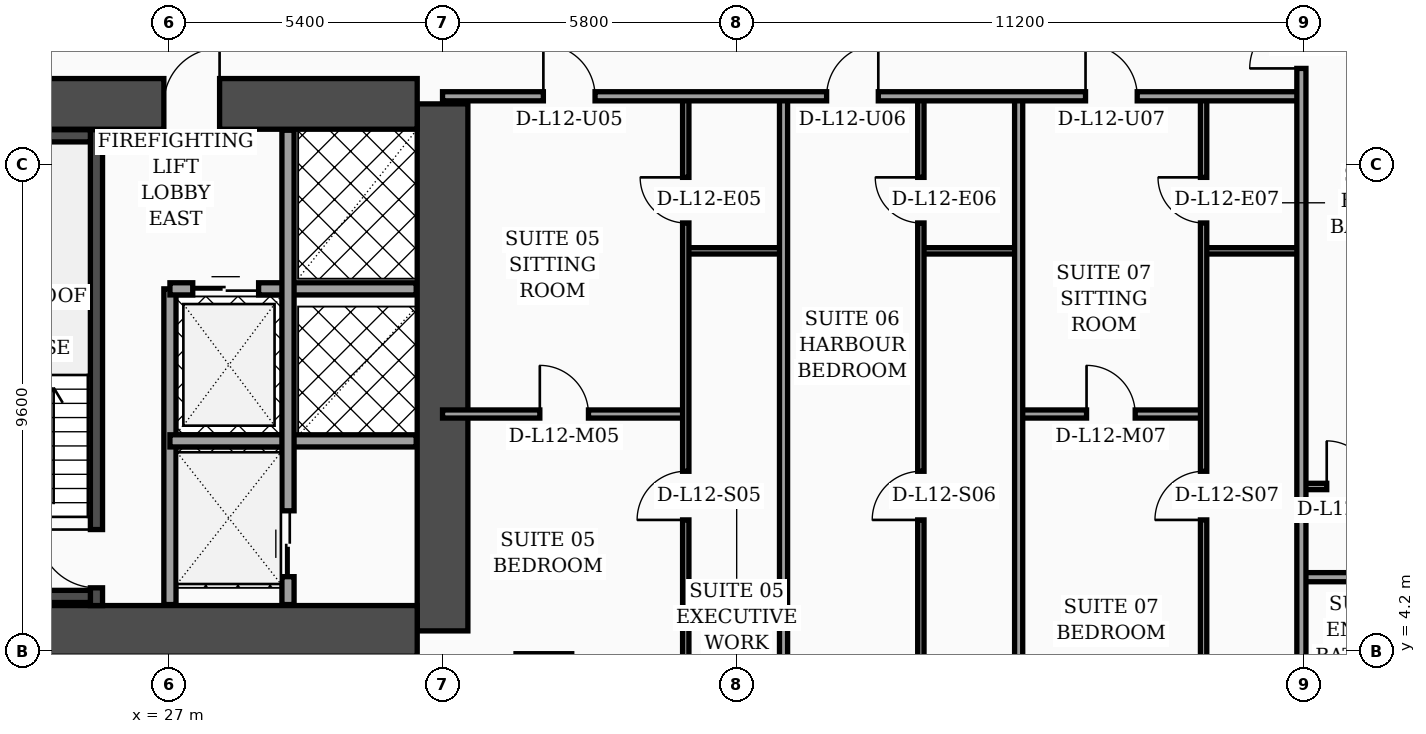
"""IFC4 building model, lengths in metres.
Left out: names, types, materials, properties, quantities, classifications, styles, units other than length and angle.
Written with IfcOpenShell. Run it as: python <this file> out.ifc"""

import sys

from ifc_helpers import new_model, si_unit, direction, frame, frame_2d, origin, origin_2d, place, context, subcontext, project, spatial, rectangle, hollow_rectangle, extrude, element, fill, save


model = new_model("IFC4")
c1 = context("Model", 3, precision=1e-05, world=origin(), true_north=direction((0.0, 1.0)))
c2 = subcontext(c1, "Body", "Model", "MODEL_VIEW")
j1 = project(units=[si_unit("LENGTHUNIT", "METRE"), si_unit("PLANEANGLEUNIT", "RADIAN")], contexts=[c1])
p1 = place(None, origin())
s1 = spatial("IfcSite", under=j1, at=p1, CompositionType="ELEMENT")
p2 = place(p1, origin())
s2 = spatial("IfcBuilding", under=s1, at=p2, CompositionType="ELEMENT")
p3 = place(p2, frame((0.0, 0.0, 54.6)))
s3 = spatial("IfcBuildingStorey", under=s2, at=p3, CompositionType="ELEMENT", Elevation=54.6)
p4 = place(p3, frame((32.4, 4.6, 0.0), z_axis=(0.0, 0.0, 1.0), x_axis=(0.0, 1.0, 0.0)))
e1 = element("IfcWall", 1, at=p4, inside=s3, PredefinedType="SHEAR", context=c2, shape_type="SweptSolid", body=[
    extrude(rectangle(XDim=10.4, YDim=1.0, at=frame_2d((5.2, 0.0))), origin(), (0.0, 0.0, 1.0), 3.56),
])
p5 = place(p3, frame((22.1, 15.0, 0.0), z_axis=(0.0, 0.0, 1.0), x_axis=(1.0, 0.0, 0.0)))
e2 = element("IfcWall", 2, at=p5, inside=s3, PredefinedType="SHEAR", context=c2, shape_type="SweptSolid", body=[
    extrude(rectangle(XDim=9.8, YDim=1.0, at=frame_2d((4.9, 0.0))), origin(), (0.0, 0.0, 1.0), 3.56),
])
p6 = place(p5, frame((4.8, 0.0, 0.0)))
e3 = element("IfcOpeningElement", 3, at=p6, cuts=e2, PredefinedType="OPENING", context=c2, shape_type="SweptSolid", body=[
    extrude(rectangle(XDim=1.1, YDim=2.2, at=frame_2d((0.55, 1.1))), frame((0.0, 0.51, 0.0), z_axis=(0.0, -1.0, 0.0), x_axis=(1.0, 0.0, 0.0)), (0.0, 0.0, 1.0), 1.02),
])
p7 = place(p3, frame((22.1, 4.6, 0.0), z_axis=(0.0, 0.0, 1.0), x_axis=(1.0, 0.0, 0.0)))
e4 = element("IfcWall", 4, at=p7, inside=s3, PredefinedType="SHEAR", context=c2, shape_type="SweptSolid", body=[
    extrude(rectangle(XDim=9.8, YDim=1.0, at=frame_2d((4.9, 0.0))), origin(), (0.0, 0.0, 1.0), 3.56),
])
p8 = place(p3, frame((25.57, 5.1, 0.0), z_axis=(0.0, 0.0, 1.0), x_axis=(0.0, 1.0, 0.0)))
e5 = element("IfcWall", 5, at=p8, inside=s3, PredefinedType="SOLIDWALL", context=c2, shape_type="SweptSolid", body=[
    extrude(rectangle(XDim=9.39, YDim=0.24, at=frame_2d((4.695, 0.0))), origin(), (0.0, 0.0, 1.0), 3.56),
])
p9 = place(p8, frame((0.35, 0.0, 0.0)))
e6 = element("IfcOpeningElement", 6, at=p9, cuts=e5, PredefinedType="OPENING", context=c2, shape_type="SweptSolid", body=[
    extrude(rectangle(XDim=1.15, YDim=2.2, at=frame_2d((0.575, 1.1))), frame((0.0, 0.13, 0.0), z_axis=(0.0, -1.0, 0.0), x_axis=(1.0, 0.0, 0.0)), (0.0, 0.0, 1.0), 0.26),
])
for number, where, z_axis, x_axis in (
    (7, (22.35, 5.28, 0.0), (0.0, 0.0, 1.0), (1.0, 0.0, 0.0)),
    (8, (22.35, 14.37, 0.0), (0.0, 0.0, 1.0), (1.0, 0.0, 0.0)),
):
    element("IfcWall", number, at=place(p3, frame(where, z_axis=z_axis, x_axis=x_axis)), inside=s3, PredefinedType="SOLIDWALL", context=c2, shape_type="SweptSolid", body=[
        extrude(rectangle(XDim=3.1, YDim=0.24, at=frame_2d((1.55, 0.0))), origin(), (0.0, 0.0, 1.0), 3.56),
    ])
p10 = place(p3, frame((34.4, 3.6, 0.0), z_axis=(0.0, 0.0, 1.0), x_axis=(1.0, 0.0, 0.0)))
e9 = element("IfcColumn", 9, at=p10, inside=s3, PredefinedType="COLUMN", context=c2, shape_type="SweptSolid", body=[
    extrude(hollow_rectangle(XDim=1.1, YDim=1.1, WallThickness=0.045, at=origin_2d()), origin(), (0.0, 0.0, 1.0), 3.56),
])
p11 = place(p3, frame((27.02, 5.12, 0.0), z_axis=(0.0, 0.0, 1.0), x_axis=(0.0, 1.0, 0.0)))
e10 = element("IfcWall", 10, at=p11, inside=s3, PredefinedType="SOLIDWALL", context=c2, shape_type="SweptSolid", body=[
    extrude(rectangle(XDim=6.23, YDim=0.24, at=frame_2d((3.115, 0.0))), origin(), (0.0, 0.0, 1.0), 3.56),
])
p12 = place(p3, frame((27.02, 11.35, 0.0), z_axis=(0.0, 0.0, 1.0), x_axis=(1.0, 0.0, 0.0)))
e11 = element("IfcWall", 11, at=p12, inside=s3, PredefinedType="SOLIDWALL", context=c2, shape_type="SweptSolid", body=[
    extrude(rectangle(XDim=4.86, YDim=0.24, at=frame_2d((2.43, 0.0))), origin(), (0.0, 0.0, 1.0), 3.56),
])
p13 = place(p12, frame((0.45, 0.0, 0.0)))
e12 = element("IfcOpeningElement", 12, at=p13, cuts=e11, PredefinedType="OPENING", context=c2, shape_type="SweptSolid", body=[
    extrude(rectangle(XDim=1.3, YDim=2.35, at=frame_2d((0.65, 1.175))), frame((0.0, 0.13, 0.0), z_axis=(0.0, -1.0, 0.0), x_axis=(1.0, 0.0, 0.0)), (0.0, 0.0, 1.0), 0.26),
])
p14 = place(p3, frame((27.02, 8.35, 0.0), z_axis=(0.0, 0.0, 1.0), x_axis=(1.0, 0.0, 0.0)))
e13 = element("IfcWall", 13, at=p14, inside=s3, PredefinedType="SOLIDWALL", context=c2, shape_type="SweptSolid", body=[
    extrude(rectangle(XDim=4.86, YDim=0.24, at=frame_2d((2.43, 0.0))), origin(), (0.0, 0.0, 1.0), 3.56),
])
p15 = place(p3, frame((29.35, 5.12, 0.0), z_axis=(0.0, 0.0, 1.0), x_axis=(0.0, 1.0, 0.0)))
e14 = element("IfcWall", 14, at=p15, inside=s3, PredefinedType="SOLIDWALL", context=c2, shape_type="SweptSolid", body=[
    extrude(rectangle(XDim=9.36, YDim=0.24, at=frame_2d((4.68, 0.0))), origin(), (0.0, 0.0, 1.0), 3.56),
])
p16 = place(p15, frame((0.55, 0.0, 0.0)))
e15 = element("IfcOpeningElement", 15, at=p16, cuts=e14, PredefinedType="OPENING", context=c2, shape_type="SweptSolid", body=[
    extrude(rectangle(XDim=1.3, YDim=2.35, at=frame_2d((0.65, 1.175))), frame((0.0, 0.13, 0.0), z_axis=(0.0, -1.0, 0.0), x_axis=(1.0, 0.0, 0.0)), (0.0, 0.0, 1.0), 0.26),
])
p17 = place(p3, frame((37.2, 12.1, 0.0), z_axis=(0.0, 0.0, 1.0), x_axis=(1.0, 0.0, 0.0)))
e16 = element("IfcWall", 16, at=p17, inside=s3, PredefinedType="PARTITIONING", context=c2, shape_type="SweptSolid", body=[
    extrude(rectangle(XDim=1.93, YDim=0.125, at=frame_2d((0.965, 0.0))), origin(), (0.0, 0.0, 1.0), 3.56),
])
p18 = place(p3, frame((32.4, 8.88, 0.0), z_axis=(0.0, 0.0, 1.0), x_axis=(1.0, 0.0, 0.0)))
e17 = element("IfcWall", 17, at=p18, inside=s3, PredefinedType="PARTITIONING", context=c2, shape_type="SweptSolid", body=[
    extrude(rectangle(XDim=4.8, YDim=0.16, at=frame_2d((2.4, 0.0))), origin(), (0.0, 0.0, 1.0), 2.84),
])
p19 = place(p18, frame((1.92, 0.0, 0.0)))
e18 = element("IfcOpeningElement", 18, at=p19, cuts=e17, PredefinedType="OPENING", context=c2, shape_type="SweptSolid", body=[
    extrude(rectangle(XDim=0.96, YDim=2.2, at=frame_2d((0.48, 1.1))), frame((0.0, 0.09, 0.0), z_axis=(0.0, -1.0, 0.0), x_axis=(1.0, 0.0, 0.0)), (0.0, 0.0, 1.0), 0.18),
])
p20 = place(p3, frame((37.2, 2.44, 0.0), z_axis=(0.0, 0.0, 1.0), x_axis=(0.0, 1.0, 0.0)))
e19 = element("IfcWall", 19, at=p20, inside=s3, PredefinedType="PARTITIONING", context=c2, shape_type="SweptSolid", body=[
    extrude(rectangle(XDim=12.71, YDim=0.125, at=frame_2d((6.355, 0.0))), origin(), (0.0, 0.0, 1.0), 2.84),
])
p21 = place(p20, frame((4.35, 0.0, 0.0)))
e20 = element("IfcOpeningElement", 20, at=p21, cuts=e19, PredefinedType="OPENING", context=c2, shape_type="SweptSolid", body=[
    extrude(rectangle(XDim=0.96, YDim=2.2, at=frame_2d((0.48, 1.1))), frame((0.0, 0.073, 0.0), z_axis=(0.0, -1.0, 0.0), x_axis=(1.0, 0.0, 0.0)), (0.0, 0.0, 1.0), 0.145),
])
p22 = place(p20, frame((10.21, 0.0, 0.0)))
e21 = element("IfcOpeningElement", 21, at=p22, cuts=e19, PredefinedType="OPENING", context=c2, shape_type="SweptSolid", body=[
    extrude(rectangle(XDim=0.9, YDim=2.15, at=frame_2d((0.45, 1.075))), frame((0.0, 0.073, 0.0), z_axis=(0.0, -1.0, 0.0), x_axis=(1.0, 0.0, 0.0)), (0.0, 0.0, 1.0), 0.145),
])
p23 = place(p3, frame((41.84, 12.1, 0.0), z_axis=(0.0, 0.0, 1.0), x_axis=(1.0, 0.0, 0.0)))
e22 = element("IfcWall", 22, at=p23, inside=s3, PredefinedType="PARTITIONING", context=c2, shape_type="SweptSolid", body=[
    extrude(rectangle(XDim=1.93, YDim=0.125, at=frame_2d((0.965, 0.0))), origin(), (0.0, 0.0, 1.0), 3.56),
])
p24 = place(p3, frame((41.84, 2.44, 0.0), z_axis=(0.0, 0.0, 1.0), x_axis=(0.0, 1.0, 0.0)))
e23 = element("IfcWall", 23, at=p24, inside=s3, PredefinedType="PARTITIONING", context=c2, shape_type="SweptSolid", body=[
    extrude(rectangle(XDim=12.71, YDim=0.125, at=frame_2d((6.355, 0.0))), origin(), (0.0, 0.0, 1.0), 3.04),
])
p25 = place(p24, frame((4.35, 0.0, 0.0)))
e24 = element("IfcOpeningElement", 24, at=p25, cuts=e23, PredefinedType="OPENING", context=c2, shape_type="SweptSolid", body=[
    extrude(rectangle(XDim=0.96, YDim=2.2, at=frame_2d((0.48, 1.1))), frame((0.0, 0.073, 0.0), z_axis=(0.0, -1.0, 0.0), x_axis=(1.0, 0.0, 0.0)), (0.0, 0.0, 1.0), 0.145),
])
p26 = place(p24, frame((10.21, 0.0, 0.0)))
e25 = element("IfcOpeningElement", 25, at=p26, cuts=e23, PredefinedType="OPENING", context=c2, shape_type="SweptSolid", body=[
    extrude(rectangle(XDim=0.9, YDim=2.15, at=frame_2d((0.45, 1.075))), frame((0.0, 0.073, 0.0), z_axis=(0.0, -1.0, 0.0), x_axis=(1.0, 0.0, 0.0)), (0.0, 0.0, 1.0), 0.145),
])
p27 = place(p3, frame((39.13, 2.44, 0.0), z_axis=(0.0, 0.0, 1.0), x_axis=(0.0, 1.0, 0.0)))
e26 = element("IfcWall", 26, at=p27, inside=s3, PredefinedType="PARTITIONING", context=c2, shape_type="SweptSolid", body=[
    extrude(rectangle(XDim=12.71, YDim=0.16, at=frame_2d((6.355, 0.0))), origin(), (0.0, 0.0, 1.0), 2.84),
])
p28 = place(p3, frame((47.42, 12.1, 0.0), z_axis=(0.0, 0.0, 1.0), x_axis=(1.0, 0.0, 0.0)))
e27 = element("IfcWall", 27, at=p28, inside=s3, PredefinedType="PARTITIONING", context=c2, shape_type="SweptSolid", body=[
    extrude(rectangle(XDim=1.93, YDim=0.125, at=frame_2d((0.965, 0.0))), origin(), (0.0, 0.0, 1.0), 2.84),
])
p29 = place(p3, frame((43.77, 8.88, 0.0), z_axis=(0.0, 0.0, 1.0), x_axis=(1.0, 0.0, 0.0)))
e28 = element("IfcWall", 28, at=p29, inside=s3, PredefinedType="PARTITIONING", context=c2, shape_type="SweptSolid", body=[
    extrude(rectangle(XDim=3.65, YDim=0.16, at=frame_2d((1.825, 0.0))), origin(), (0.0, 0.0, 1.0), 3.56),
])
p30 = place(p29, frame((1.34, 0.0, 0.0)))
e29 = element("IfcOpeningElement", 29, at=p30, cuts=e28, PredefinedType="OPENING", context=c2, shape_type="SweptSolid", body=[
    extrude(rectangle(XDim=0.96, YDim=2.2, at=frame_2d((0.48, 1.1))), frame((0.0, 0.09, 0.0), z_axis=(0.0, -1.0, 0.0), x_axis=(1.0, 0.0, 0.0)), (0.0, 0.0, 1.0), 0.18),
])
p31 = place(p3, frame((47.42, 2.44, 0.0), z_axis=(0.0, 0.0, 1.0), x_axis=(0.0, 1.0, 0.0)))
e30 = element("IfcWall", 30, at=p31, inside=s3, PredefinedType="PARTITIONING", context=c2, shape_type="SweptSolid", body=[
    extrude(rectangle(XDim=12.71, YDim=0.125, at=frame_2d((6.355, 0.0))), origin(), (0.0, 0.0, 1.0), 2.84),
])
p32 = place(p31, frame((4.35, 0.0, 0.0)))
e31 = element("IfcOpeningElement", 31, at=p32, cuts=e30, PredefinedType="OPENING", context=c2, shape_type="SweptSolid", body=[
    extrude(rectangle(XDim=0.96, YDim=2.2, at=frame_2d((0.48, 1.1))), frame((0.0, 0.073, 0.0), z_axis=(0.0, -1.0, 0.0), x_axis=(1.0, 0.0, 0.0)), (0.0, 0.0, 1.0), 0.145),
])
p33 = place(p31, frame((10.21, 0.0, 0.0)))
e32 = element("IfcOpeningElement", 32, at=p33, cuts=e30, PredefinedType="OPENING", context=c2, shape_type="SweptSolid", body=[
    extrude(rectangle(XDim=0.9, YDim=2.15, at=frame_2d((0.45, 1.075))), frame((0.0, 0.073, 0.0), z_axis=(0.0, -1.0, 0.0), x_axis=(1.0, 0.0, 0.0)), (0.0, 0.0, 1.0), 0.145),
])
p34 = place(p3, frame((43.77, 2.44, 0.0), z_axis=(0.0, 0.0, 1.0), x_axis=(0.0, 1.0, 0.0)))
e33 = element("IfcWall", 33, at=p34, inside=s3, PredefinedType="PARTITIONING", context=c2, shape_type="SweptSolid", body=[
    extrude(rectangle(XDim=12.71, YDim=0.16, at=frame_2d((6.355, 0.0))), origin(), (0.0, 0.0, 1.0), 3.04),
])
p35 = place(p3, frame((32.4, 15.15, 0.0), z_axis=(0.0, 0.0, 1.0), x_axis=(1.0, 0.0, 0.0)))
e34 = element("IfcWall", 34, at=p35, inside=s3, PredefinedType="PARTITIONING", context=c2, shape_type="SweptSolid", body=[
    extrude(rectangle(XDim=16.95, YDim=0.18, at=frame_2d((8.475, 0.0))), origin(), (0.0, 0.0, 1.0), 2.84),
])
p36 = place(p35, frame((1.99, 0.0, 0.0)))
e35 = element("IfcOpeningElement", 35, at=p36, cuts=e34, PredefinedType="OPENING", context=c2, shape_type="SweptSolid", body=[
    extrude(rectangle(XDim=1.02, YDim=2.2, at=frame_2d((0.51, 1.1))), frame((0.0, 0.1, 0.0), z_axis=(0.0, -1.0, 0.0), x_axis=(1.0, 0.0, 0.0)), (0.0, 0.0, 1.0), 0.2),
])
p37 = place(p35, frame((7.58, 0.0, 0.0)))
e36 = element("IfcOpeningElement", 36, at=p37, cuts=e34, PredefinedType="OPENING", context=c2, shape_type="SweptSolid", body=[
    extrude(rectangle(XDim=1.02, YDim=2.2, at=frame_2d((0.51, 1.1))), frame((0.0, 0.1, 0.0), z_axis=(0.0, -1.0, 0.0), x_axis=(1.0, 0.0, 0.0)), (0.0, 0.0, 1.0), 0.2),
])
p38 = place(p35, frame((12.69, 0.0, 0.0)))
e37 = element("IfcOpeningElement", 37, at=p38, cuts=e34, PredefinedType="OPENING", context=c2, shape_type="SweptSolid", body=[
    extrude(rectangle(XDim=1.02, YDim=2.2, at=frame_2d((0.51, 1.1))), frame((0.0, 0.1, 0.0), z_axis=(0.0, -1.0, 0.0), x_axis=(1.0, 0.0, 0.0)), (0.0, 0.0, 1.0), 0.2),
])
p39 = place(p3, frame((49.35, 7.45, 0.0), z_axis=(0.0, 0.0, 1.0), x_axis=(1.0, 0.0, 0.0)))
e38 = element("IfcWall", 38, at=p39, inside=s3, PredefinedType="PARTITIONING", context=c2, shape_type="SweptSolid", body=[
    extrude(rectangle(XDim=13.61, YDim=0.125, at=frame_2d((6.805, 0.0))), origin(), (0.0, 0.0, 1.0), 3.04),
])
p40 = place(p39, frame((0.5, 0.0, 0.0)))
e39 = element("IfcOpeningElement", 39, at=p40, cuts=e38, PredefinedType="OPENING", context=c2, shape_type="SweptSolid", body=[
    extrude(rectangle(XDim=0.9, YDim=2.15, at=frame_2d((0.45, 1.075))), frame((0.0, 0.073, 0.0), z_axis=(0.0, -1.0, 0.0), x_axis=(1.0, 0.0, 0.0)), (0.0, 0.0, 1.0), 0.145),
])
p41 = place(p39, frame((3.6, 0.0, 0.0)))
e40 = element("IfcOpeningElement", 40, at=p41, cuts=e38, PredefinedType="OPENING", context=c2, shape_type="SweptSolid", body=[
    extrude(rectangle(XDim=0.96, YDim=2.2, at=frame_2d((0.48, 1.1))), frame((0.0, 0.073, 0.0), z_axis=(0.0, -1.0, 0.0), x_axis=(1.0, 0.0, 0.0)), (0.0, 0.0, 1.0), 0.145),
])
p42 = place(p3, frame((49.35, 5.66, 0.0), z_axis=(0.0, 0.0, 1.0), x_axis=(1.0, 0.0, 0.0)))
e41 = element("IfcWall", 41, at=p42, inside=s3, PredefinedType="PARTITIONING", context=c2, shape_type="SweptSolid", body=[
    extrude(rectangle(XDim=11.05, YDim=0.18, at=frame_2d((5.525, 0.0))), origin(), (0.0, 0.0, 1.0), 2.84),
])
p43 = place(p3, frame((49.35, 2.44, 0.0), z_axis=(0.0, 0.0, 1.0), x_axis=(0.0, 1.0, 0.0)))
e42 = element("IfcWall", 42, at=p43, inside=s3, PredefinedType="PARTITIONING", context=c2, shape_type="SweptSolid", body=[
    extrude(rectangle(XDim=27.84, YDim=0.18, at=frame_2d((13.92, 0.0))), origin(), (0.0, 0.0, 1.0), 2.84),
])
p44 = place(p43, frame((13.26, 0.0, 0.0)))
e43 = element("IfcOpeningElement", 43, at=p44, cuts=e42, PredefinedType="OPENING", context=c2, shape_type="SweptSolid", body=[
    extrude(rectangle(XDim=1.02, YDim=2.2, at=frame_2d((0.51, 1.1))), frame((0.0, 0.1, 0.0), z_axis=(0.0, -1.0, 0.0), x_axis=(1.0, 0.0, 0.0)), (0.0, 0.0, 1.0), 0.2),
])
p45 = place(p43, frame((21.52, 0.0, 0.0)))
e44 = element("IfcOpeningElement", 44, at=p45, cuts=e42, PredefinedType="OPENING", context=c2, shape_type="SweptSolid", body=[
    extrude(rectangle(XDim=1.02, YDim=2.2, at=frame_2d((0.51, 1.1))), frame((0.0, 0.1, 0.0), z_axis=(0.0, -1.0, 0.0), x_axis=(1.0, 0.0, 0.0)), (0.0, 0.0, 1.0), 0.2),
])
p46 = place(p13, origin())
e45 = element("IfcDoor", 45, at=p46, inside=s3, OperationType="DOUBLE_DOOR_SLIDING", PredefinedType="DOOR", context=c2, shape_type="SweptSolid", body=[
    extrude(rectangle(XDim=1.3, YDim=2.35, at=frame_2d((0.65, 1.175))), frame((0.0, 0.025, 0.0), z_axis=(0.0, -1.0, 0.0), x_axis=(1.0, 0.0, 0.0)), (0.0, 0.0, 1.0), 0.05),
])
fill(e12, e45)
p47 = place(p16, origin())
e46 = element("IfcDoor", 46, at=p47, inside=s3, OperationType="DOUBLE_DOOR_SLIDING", PredefinedType="DOOR", context=c2, shape_type="SweptSolid", body=[
    extrude(rectangle(XDim=1.3, YDim=2.35, at=frame_2d((0.65, 1.175))), frame((0.0, 0.025, 0.0), z_axis=(0.0, -1.0, 0.0), x_axis=(1.0, 0.0, 0.0)), (0.0, 0.0, 1.0), 0.05),
])
fill(e15, e46)
p48 = place(p19, origin())
e47 = element("IfcDoor", 47, at=p48, inside=s3, OperationType="SINGLE_SWING_LEFT", PredefinedType="DOOR", context=c2, shape_type="SweptSolid", body=[
    extrude(rectangle(XDim=0.96, YDim=2.2, at=frame_2d((0.48, 1.1))), frame((0.0, 0.025, 0.0), z_axis=(0.0, -1.0, 0.0), x_axis=(1.0, 0.0, 0.0)), (0.0, 0.0, 1.0), 0.05),
])
fill(e18, e47)
p49 = place(p21, origin())
e48 = element("IfcDoor", 48, at=p49, inside=s3, OperationType="SINGLE_SWING_LEFT", PredefinedType="DOOR", context=c2, shape_type="SweptSolid", body=[
    extrude(rectangle(XDim=0.96, YDim=2.2, at=frame_2d((0.48, 1.1))), frame((0.0, 0.025, 0.0), z_axis=(0.0, -1.0, 0.0), x_axis=(1.0, 0.0, 0.0)), (0.0, 0.0, 1.0), 0.05),
])
fill(e20, e48)
p50 = place(p22, origin())
e49 = element("IfcDoor", 49, at=p50, inside=s3, OperationType="SINGLE_SWING_RIGHT", PredefinedType="DOOR", context=c2, shape_type="SweptSolid", body=[
    extrude(rectangle(XDim=0.9, YDim=2.15, at=frame_2d((0.45, 1.075))), frame((0.0, 0.025, 0.0), z_axis=(0.0, -1.0, 0.0), x_axis=(1.0, 0.0, 0.0)), (0.0, 0.0, 1.0), 0.05),
])
fill(e21, e49)
p51 = place(p25, origin())
e50 = element("IfcDoor", 50, at=p51, inside=s3, OperationType="SINGLE_SWING_LEFT", PredefinedType="DOOR", context=c2, shape_type="SweptSolid", body=[
    extrude(rectangle(XDim=0.96, YDim=2.2, at=frame_2d((0.48, 1.1))), frame((0.0, 0.025, 0.0), z_axis=(0.0, -1.0, 0.0), x_axis=(1.0, 0.0, 0.0)), (0.0, 0.0, 1.0), 0.05),
])
fill(e24, e50)
p52 = place(p26, origin())
e51 = element("IfcDoor", 51, at=p52, inside=s3, OperationType="SINGLE_SWING_RIGHT", PredefinedType="DOOR", context=c2, shape_type="SweptSolid", body=[
    extrude(rectangle(XDim=0.9, YDim=2.15, at=frame_2d((0.45, 1.075))), frame((0.0, 0.025, 0.0), z_axis=(0.0, -1.0, 0.0), x_axis=(1.0, 0.0, 0.0)), (0.0, 0.0, 1.0), 0.05),
])
fill(e25, e51)
p53 = place(p30, origin())
e52 = element("IfcDoor", 52, at=p53, inside=s3, OperationType="SINGLE_SWING_LEFT", PredefinedType="DOOR", context=c2, shape_type="SweptSolid", body=[
    extrude(rectangle(XDim=0.96, YDim=2.2, at=frame_2d((0.48, 1.1))), frame((0.0, 0.025, 0.0), z_axis=(0.0, -1.0, 0.0), x_axis=(1.0, 0.0, 0.0)), (0.0, 0.0, 1.0), 0.05),
])
fill(e29, e52)
p54 = place(p32, origin())
e53 = element("IfcDoor", 53, at=p54, inside=s3, OperationType="SINGLE_SWING_LEFT", PredefinedType="DOOR", context=c2, shape_type="SweptSolid", body=[
    extrude(rectangle(XDim=0.96, YDim=2.2, at=frame_2d((0.48, 1.1))), frame((0.0, 0.025, 0.0), z_axis=(0.0, -1.0, 0.0), x_axis=(1.0, 0.0, 0.0)), (0.0, 0.0, 1.0), 0.05),
])
fill(e31, e53)
p55 = place(p33, origin())
e54 = element("IfcDoor", 54, at=p55, inside=s3, OperationType="SINGLE_SWING_RIGHT", PredefinedType="DOOR", context=c2, shape_type="SweptSolid", body=[
    extrude(rectangle(XDim=0.9, YDim=2.15, at=frame_2d((0.45, 1.075))), frame((0.0, 0.025, 0.0), z_axis=(0.0, -1.0, 0.0), x_axis=(1.0, 0.0, 0.0)), (0.0, 0.0, 1.0), 0.05),
])
fill(e32, e54)
p56 = place(p36, origin())
e55 = element("IfcDoor", 55, at=p56, inside=s3, OperationType="SINGLE_SWING_LEFT", PredefinedType="DOOR", context=c2, shape_type="SweptSolid", body=[
    extrude(rectangle(XDim=1.02, YDim=2.2, at=frame_2d((0.51, 1.1))), frame((0.0, 0.025, 0.0), z_axis=(0.0, -1.0, 0.0), x_axis=(1.0, 0.0, 0.0)), (0.0, 0.0, 1.0), 0.05),
])
fill(e35, e55)
p57 = place(p37, origin())
e56 = element("IfcDoor", 56, at=p57, inside=s3, OperationType="SINGLE_SWING_RIGHT", PredefinedType="DOOR", context=c2, shape_type="SweptSolid", body=[
    extrude(rectangle(XDim=1.02, YDim=2.2, at=frame_2d((0.51, 1.1))), frame((0.0, 0.025, 0.0), z_axis=(0.0, -1.0, 0.0), x_axis=(1.0, 0.0, 0.0)), (0.0, 0.0, 1.0), 0.05),
])
fill(e36, e56)
p58 = place(p38, origin())
e57 = element("IfcDoor", 57, at=p58, inside=s3, OperationType="SINGLE_SWING_LEFT", PredefinedType="DOOR", context=c2, shape_type="SweptSolid", body=[
    extrude(rectangle(XDim=1.02, YDim=2.2, at=frame_2d((0.51, 1.1))), frame((0.0, 0.025, 0.0), z_axis=(0.0, -1.0, 0.0), x_axis=(1.0, 0.0, 0.0)), (0.0, 0.0, 1.0), 0.05),
])
fill(e37, e57)
p59 = place(p40, origin())
e58 = element("IfcDoor", 58, at=p59, inside=s3, OperationType="SINGLE_SWING_LEFT", PredefinedType="DOOR", context=c2, shape_type="SweptSolid", body=[
    extrude(rectangle(XDim=0.9, YDim=2.15, at=frame_2d((0.45, 1.075))), frame((0.0, 0.025, 0.0), z_axis=(0.0, -1.0, 0.0), x_axis=(1.0, 0.0, 0.0)), (0.0, 0.0, 1.0), 0.05),
])
fill(e39, e58)
p60 = place(p44, origin())
e59 = element("IfcDoor", 59, at=p60, inside=s3, OperationType="SINGLE_SWING_LEFT", PredefinedType="DOOR", context=c2, shape_type="SweptSolid", body=[
    extrude(rectangle(XDim=1.02, YDim=2.2, at=frame_2d((0.51, 1.1))), frame((0.0, 0.025, 0.0), z_axis=(0.0, -1.0, 0.0), x_axis=(1.0, 0.0, 0.0)), (0.0, 0.0, 1.0), 0.05),
])
fill(e43, e59)
p61 = place(p9, origin())
e60 = element("IfcDoor", 60, at=p61, inside=s3, OperationType="SINGLE_SWING_RIGHT", PredefinedType="DOOR", context=c2, shape_type="SweptSolid", body=[
    extrude(rectangle(XDim=1.15, YDim=2.2, at=frame_2d((0.575, 1.1))), frame((0.0, 0.025, 0.0), z_axis=(0.0, -1.0, 0.0), x_axis=(1.0, 0.0, 0.0)), (0.0, 0.0, 1.0), 0.05),
])
fill(e6, e60)
p62 = place(p6, origin())
e61 = element("IfcDoor", 61, at=p62, inside=s3, OperationType="SINGLE_SWING_RIGHT", PredefinedType="DOOR", context=c2, shape_type="SweptSolid", body=[
    extrude(rectangle(XDim=1.1, YDim=2.2, at=frame_2d((0.55, 1.1))), frame((0.0, 0.025, 0.0), z_axis=(0.0, -1.0, 0.0), x_axis=(1.0, 0.0, 0.0)), (0.0, 0.0, 1.0), 0.05),
])
fill(e3, e61)
save(model, sys.argv[1])
